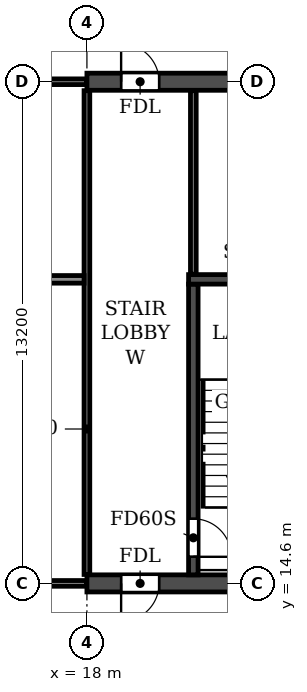
"""IFC4 building model, lengths in metres.
Left out: names, types, materials, properties, quantities, classifications, styles, units other than length and angle.
Written with IfcOpenShell. Run it as: python <this file> out.ifc"""

import sys

from ifc_helpers import new_model, si_unit, direction, frame, frame_2d, origin, place, context, subcontext, project, spatial, rectangle, extrude, element, fill, save


model = new_model("IFC4")
c1 = context("Model", 3, precision=1e-05, world=origin(), true_north=direction((0.0, 1.0)))
c2 = subcontext(c1, "Body", "Model", "MODEL_VIEW")
j1 = project(units=[si_unit("LENGTHUNIT", "METRE"), si_unit("PLANEANGLEUNIT", "RADIAN")], contexts=[c1])
p1 = place(None, origin())
s1 = spatial("IfcSite", under=j1, at=p1, CompositionType="ELEMENT")
p2 = place(p1, origin())
s2 = spatial("IfcBuilding", under=s1, at=p2, CompositionType="ELEMENT")
p3 = place(p2, frame((0.0, 0.0, 6.0)))
s3 = spatial("IfcBuildingStorey", under=s2, at=p3, CompositionType="ELEMENT", Elevation=6.0)
p4 = place(p3, frame((18.0, 14.6, 0.0), z_axis=(0.0, 0.0, 1.0), x_axis=(1.0, 0.0, 0.0)))
e1 = element("IfcWall", 1, at=p4, inside=s3, PredefinedType="SOLIDWALL", context=c2, shape_type="SweptSolid", body=[
    extrude(rectangle(XDim=66.0, YDim=0.45, at=frame_2d((33.0, 0.0))), origin(), (0.0, 0.0, 1.0), 4.52),
])
p5 = place(p4, frame((0.9, 0.0, 0.0)))
e2 = element("IfcOpeningElement", 2, at=p5, cuts=e1, PredefinedType="OPENING", context=c2, shape_type="SweptSolid", body=[
    extrude(rectangle(XDim=1.0, YDim=2.1, at=frame_2d((0.5, 1.05))), frame((0.0, 0.235, 0.0), z_axis=(0.0, -1.0, 0.0), x_axis=(1.0, 0.0, 0.0)), (0.0, 0.0, 1.0), 0.47),
])
p6 = place(p4, frame((8.8, 0.0, 0.0)))
e3 = element("IfcOpeningElement", 3, at=p6, cuts=e1, PredefinedType="OPENING", context=c2, shape_type="SweptSolid", body=[
    extrude(rectangle(XDim=1.0, YDim=2.1, at=frame_2d((0.5, 1.05))), frame((0.0, 0.235, 0.0), z_axis=(0.0, -1.0, 0.0), x_axis=(1.0, 0.0, 0.0)), (0.0, 0.0, 1.0), 0.47),
])
p7 = place(p4, frame((13.4, 0.0, 0.0)))
e4 = element("IfcOpeningElement", 4, at=p7, cuts=e1, PredefinedType="OPENING", context=c2, shape_type="SweptSolid", body=[
    extrude(rectangle(XDim=1.0, YDim=2.1, at=frame_2d((0.5, 1.05))), frame((0.0, 0.235, 0.0), z_axis=(0.0, -1.0, 0.0), x_axis=(1.0, 0.0, 0.0)), (0.0, 0.0, 1.0), 0.47),
])
p8 = place(p4, frame((26.0, 0.0, 0.0)))
e5 = element("IfcOpeningElement", 5, at=p8, cuts=e1, PredefinedType="OPENING", context=c2, shape_type="SweptSolid", body=[
    extrude(rectangle(XDim=1.0, YDim=2.1, at=frame_2d((0.5, 1.05))), frame((0.0, 0.235, 0.0), z_axis=(0.0, -1.0, 0.0), x_axis=(1.0, 0.0, 0.0)), (0.0, 0.0, 1.0), 0.47),
])
p9 = place(p4, frame((29.9, 0.0, 0.0)))
e6 = element("IfcOpeningElement", 6, at=p9, cuts=e1, PredefinedType="OPENING", context=c2, shape_type="SweptSolid", body=[
    extrude(rectangle(XDim=1.0, YDim=2.1, at=frame_2d((0.5, 1.05))), frame((0.0, 0.235, 0.0), z_axis=(0.0, -1.0, 0.0), x_axis=(1.0, 0.0, 0.0)), (0.0, 0.0, 1.0), 0.47),
])
p10 = place(p4, frame((32.5, 0.0, 0.0)))
e7 = element("IfcOpeningElement", 7, at=p10, cuts=e1, PredefinedType="OPENING", context=c2, shape_type="SweptSolid", body=[
    extrude(rectangle(XDim=1.0, YDim=2.1, at=frame_2d((0.5, 1.05))), frame((0.0, 0.235, 0.0), z_axis=(0.0, -1.0, 0.0), x_axis=(1.0, 0.0, 0.0)), (0.0, 0.0, 1.0), 0.47),
])
p11 = place(p4, frame((37.7, 0.0, 0.0)))
e8 = element("IfcOpeningElement", 8, at=p11, cuts=e1, PredefinedType="OPENING", context=c2, shape_type="SweptSolid", body=[
    extrude(rectangle(XDim=1.0, YDim=2.1, at=frame_2d((0.5, 1.05))), frame((0.0, 0.235, 0.0), z_axis=(0.0, -1.0, 0.0), x_axis=(1.0, 0.0, 0.0)), (0.0, 0.0, 1.0), 0.47),
])
p12 = place(p4, frame((51.6, 0.0, 0.0)))
e9 = element("IfcOpeningElement", 9, at=p12, cuts=e1, PredefinedType="OPENING", context=c2, shape_type="SweptSolid", body=[
    extrude(rectangle(XDim=1.0, YDim=2.1, at=frame_2d((0.5, 1.05))), frame((0.0, 0.235, 0.0), z_axis=(0.0, -1.0, 0.0), x_axis=(1.0, 0.0, 0.0)), (0.0, 0.0, 1.0), 0.47),
])
p13 = place(p4, frame((56.2, 0.0, 0.0)))
e10 = element("IfcOpeningElement", 10, at=p13, cuts=e1, PredefinedType="OPENING", context=c2, shape_type="SweptSolid", body=[
    extrude(rectangle(XDim=1.0, YDim=2.1, at=frame_2d((0.5, 1.05))), frame((0.0, 0.235, 0.0), z_axis=(0.0, -1.0, 0.0), x_axis=(1.0, 0.0, 0.0)), (0.0, 0.0, 1.0), 0.47),
])
p14 = place(p4, frame((64.1, 0.0, 0.0)))
e11 = element("IfcOpeningElement", 11, at=p14, cuts=e1, PredefinedType="OPENING", context=c2, shape_type="SweptSolid", body=[
    extrude(rectangle(XDim=1.0, YDim=2.1, at=frame_2d((0.5, 1.05))), frame((0.0, 0.235, 0.0), z_axis=(0.0, -1.0, 0.0), x_axis=(1.0, 0.0, 0.0)), (0.0, 0.0, 1.0), 0.47),
])
p15 = place(p3, frame((18.0, 27.8, 0.0), z_axis=(0.0, 0.0, 1.0), x_axis=(1.0, 0.0, 0.0)))
e12 = element("IfcWall", 12, at=p15, inside=s3, PredefinedType="SOLIDWALL", context=c2, shape_type="SweptSolid", body=[
    extrude(rectangle(XDim=66.0, YDim=0.45, at=frame_2d((33.0, 0.0))), origin(), (0.0, 0.0, 1.0), 4.52),
])
p16 = place(p15, frame((0.9, 0.0, 0.0)))
e13 = element("IfcOpeningElement", 13, at=p16, cuts=e12, PredefinedType="OPENING", context=c2, shape_type="SweptSolid", body=[
    extrude(rectangle(XDim=1.0, YDim=2.1, at=frame_2d((0.5, 1.05))), frame((0.0, 0.235, 0.0), z_axis=(0.0, -1.0, 0.0), x_axis=(1.0, 0.0, 0.0)), (0.0, 0.0, 1.0), 0.47),
])
p17 = place(p15, frame((4.25, 0.0, 0.0)))
e14 = element("IfcOpeningElement", 14, at=p17, cuts=e12, PredefinedType="OPENING", context=c2, shape_type="SweptSolid", body=[
    extrude(rectangle(XDim=0.9, YDim=2.1, at=frame_2d((0.45, 1.05))), frame((0.0, 0.235, 0.0), z_axis=(0.0, -1.0, 0.0), x_axis=(1.0, 0.0, 0.0)), (0.0, 0.0, 1.0), 0.47),
])
p18 = place(p15, frame((8.85, 0.0, 0.0)))
e15 = element("IfcOpeningElement", 15, at=p18, cuts=e12, PredefinedType="OPENING", context=c2, shape_type="SweptSolid", body=[
    extrude(rectangle(XDim=0.9, YDim=2.1, at=frame_2d((0.45, 1.05))), frame((0.0, 0.235, 0.0), z_axis=(0.0, -1.0, 0.0), x_axis=(1.0, 0.0, 0.0)), (0.0, 0.0, 1.0), 0.47),
])
p19 = place(p15, frame((13.45, 0.0, 0.0)))
e16 = element("IfcOpeningElement", 16, at=p19, cuts=e12, PredefinedType="OPENING", context=c2, shape_type="SweptSolid", body=[
    extrude(rectangle(XDim=0.9, YDim=2.1, at=frame_2d((0.45, 1.05))), frame((0.0, 0.235, 0.0), z_axis=(0.0, -1.0, 0.0), x_axis=(1.0, 0.0, 0.0)), (0.0, 0.0, 1.0), 0.47),
])
p20 = place(p15, frame((17.9, 0.0, 0.0)))
e17 = element("IfcOpeningElement", 17, at=p20, cuts=e12, PredefinedType="OPENING", context=c2, shape_type="SweptSolid", body=[
    extrude(rectangle(XDim=1.0, YDim=2.1, at=frame_2d((0.5, 1.05))), frame((0.0, 0.235, 0.0), z_axis=(0.0, -1.0, 0.0), x_axis=(1.0, 0.0, 0.0)), (0.0, 0.0, 1.0), 0.47),
])
p21 = place(p15, frame((23.1, 0.0, 0.0)))
e18 = element("IfcOpeningElement", 18, at=p21, cuts=e12, PredefinedType="OPENING", context=c2, shape_type="SweptSolid", body=[
    extrude(rectangle(XDim=1.0, YDim=2.1, at=frame_2d((0.5, 1.05))), frame((0.0, 0.235, 0.0), z_axis=(0.0, -1.0, 0.0), x_axis=(1.0, 0.0, 0.0)), (0.0, 0.0, 1.0), 0.47),
])
p22 = place(p15, frame((29.6, 0.0, 0.0)))
e19 = element("IfcOpeningElement", 19, at=p22, cuts=e12, PredefinedType="OPENING", context=c2, shape_type="SweptSolid", body=[
    extrude(rectangle(XDim=1.0, YDim=2.1, at=frame_2d((0.5, 1.05))), frame((0.0, 0.235, 0.0), z_axis=(0.0, -1.0, 0.0), x_axis=(1.0, 0.0, 0.0)), (0.0, 0.0, 1.0), 0.47),
])
p23 = place(p15, frame((32.5, 0.0, 0.0)))
e20 = element("IfcOpeningElement", 20, at=p23, cuts=e12, PredefinedType="OPENING", context=c2, shape_type="SweptSolid", body=[
    extrude(rectangle(XDim=1.0, YDim=2.1, at=frame_2d((0.5, 1.05))), frame((0.0, 0.235, 0.0), z_axis=(0.0, -1.0, 0.0), x_axis=(1.0, 0.0, 0.0)), (0.0, 0.0, 1.0), 0.47),
])
p24 = place(p15, frame((38.0, 0.0, 0.0)))
e21 = element("IfcOpeningElement", 21, at=p24, cuts=e12, PredefinedType="OPENING", context=c2, shape_type="SweptSolid", body=[
    extrude(rectangle(XDim=1.0, YDim=2.1, at=frame_2d((0.5, 1.05))), frame((0.0, 0.235, 0.0), z_axis=(0.0, -1.0, 0.0), x_axis=(1.0, 0.0, 0.0)), (0.0, 0.0, 1.0), 0.47),
])
p25 = place(p15, frame((43.2, 0.0, 0.0)))
e22 = element("IfcOpeningElement", 22, at=p25, cuts=e12, PredefinedType="OPENING", context=c2, shape_type="SweptSolid", body=[
    extrude(rectangle(XDim=1.0, YDim=2.1, at=frame_2d((0.5, 1.05))), frame((0.0, 0.235, 0.0), z_axis=(0.0, -1.0, 0.0), x_axis=(1.0, 0.0, 0.0)), (0.0, 0.0, 1.0), 0.47),
])
p26 = place(p15, frame((45.8, 0.0, 0.0)))
e23 = element("IfcOpeningElement", 23, at=p26, cuts=e12, PredefinedType="OPENING", context=c2, shape_type="SweptSolid", body=[
    extrude(rectangle(XDim=1.0, YDim=2.1, at=frame_2d((0.5, 1.05))), frame((0.0, 0.235, 0.0), z_axis=(0.0, -1.0, 0.0), x_axis=(1.0, 0.0, 0.0)), (0.0, 0.0, 1.0), 0.47),
])
p27 = place(p15, frame((48.4, 0.0, 0.0)))
e24 = element("IfcOpeningElement", 24, at=p27, cuts=e12, PredefinedType="OPENING", context=c2, shape_type="SweptSolid", body=[
    extrude(rectangle(XDim=1.0, YDim=2.1, at=frame_2d((0.5, 1.05))), frame((0.0, 0.235, 0.0), z_axis=(0.0, -1.0, 0.0), x_axis=(1.0, 0.0, 0.0)), (0.0, 0.0, 1.0), 0.47),
])
p28 = place(p15, frame((51.65, 0.0, 0.0)))
e25 = element("IfcOpeningElement", 25, at=p28, cuts=e12, PredefinedType="OPENING", context=c2, shape_type="SweptSolid", body=[
    extrude(rectangle(XDim=0.9, YDim=2.1, at=frame_2d((0.45, 1.05))), frame((0.0, 0.235, 0.0), z_axis=(0.0, -1.0, 0.0), x_axis=(1.0, 0.0, 0.0)), (0.0, 0.0, 1.0), 0.47),
])
p29 = place(p15, frame((56.25, 0.0, 0.0)))
e26 = element("IfcOpeningElement", 26, at=p29, cuts=e12, PredefinedType="OPENING", context=c2, shape_type="SweptSolid", body=[
    extrude(rectangle(XDim=0.9, YDim=2.1, at=frame_2d((0.45, 1.05))), frame((0.0, 0.235, 0.0), z_axis=(0.0, -1.0, 0.0), x_axis=(1.0, 0.0, 0.0)), (0.0, 0.0, 1.0), 0.47),
])
p30 = place(p15, frame((60.85, 0.0, 0.0)))
e27 = element("IfcOpeningElement", 27, at=p30, cuts=e12, PredefinedType="OPENING", context=c2, shape_type="SweptSolid", body=[
    extrude(rectangle(XDim=0.9, YDim=2.1, at=frame_2d((0.45, 1.05))), frame((0.0, 0.235, 0.0), z_axis=(0.0, -1.0, 0.0), x_axis=(1.0, 0.0, 0.0)), (0.0, 0.0, 1.0), 0.47),
])
p31 = place(p15, frame((64.1, 0.0, 0.0)))
e28 = element("IfcOpeningElement", 28, at=p31, cuts=e12, PredefinedType="OPENING", context=c2, shape_type="SweptSolid", body=[
    extrude(rectangle(XDim=1.0, YDim=2.1, at=frame_2d((0.5, 1.05))), frame((0.0, 0.235, 0.0), z_axis=(0.0, -1.0, 0.0), x_axis=(1.0, 0.0, 0.0)), (0.0, 0.0, 1.0), 0.47),
])
p32 = place(p3, frame((20.8, 14.825, 0.0), z_axis=(0.0, 0.0, 1.0), x_axis=(0.0, 1.0, 0.0)))
e29 = element("IfcWall", 29, at=p32, inside=s3, PredefinedType="SOLIDWALL", context=c2, shape_type="SweptSolid", body=[
    extrude(rectangle(XDim=7.65, YDim=0.25, at=frame_2d((3.825, 0.0))), origin(), (0.0, 0.0, 1.0), 4.52),
])
p33 = place(p32, frame((0.475, 0.0, 0.0)))
e30 = element("IfcOpeningElement", 30, at=p33, cuts=e29, PredefinedType="OPENING", context=c2, shape_type="SweptSolid", body=[
    extrude(rectangle(XDim=1.0, YDim=2.1, at=frame_2d((0.5, 1.05))), frame((0.0, 0.135, 0.0), z_axis=(0.0, -1.0, 0.0), x_axis=(1.0, 0.0, 0.0)), (0.0, 0.0, 1.0), 0.27),
])
p34 = place(p3, frame((20.675, 22.6, 0.0), z_axis=(0.0, 0.0, 1.0), x_axis=(1.0, 0.0, 0.0)))
e31 = element("IfcWall", 31, at=p34, inside=s3, PredefinedType="SOLIDWALL", context=c2, shape_type="SweptSolid", body=[
    extrude(rectangle(XDim=4.05, YDim=0.25, at=frame_2d((2.025, 0.0))), origin(), (0.0, 0.0, 1.0), 4.52),
])
p35 = place(p3, frame((2.525, 14.6, 0.0), z_axis=(0.0, 0.0, 1.0), x_axis=(1.0, 0.0, 0.0)))
e32 = element("IfcWall", 32, at=p35, inside=s3, PredefinedType="PARTITIONING", context=c2, shape_type="SweptSolid", body=[
    extrude(rectangle(XDim=15.465, YDim=0.15, at=frame_2d((7.732, 0.0))), origin(), (0.0, 0.0, 1.0), 4.52),
])
p36 = place(p35, frame((11.175, 0.0, 0.0)))
e33 = element("IfcOpeningElement", 33, at=p36, cuts=e32, PredefinedType="OPENING", context=c2, shape_type="SweptSolid", body=[
    extrude(rectangle(XDim=0.9, YDim=2.1, at=frame_2d((0.45, 1.05))), frame((0.0, 0.085, 0.0), z_axis=(0.0, -1.0, 0.0), x_axis=(1.0, 0.0, 0.0)), (0.0, 0.0, 1.0), 0.17),
])
p37 = place(p3, frame((2.525, 27.8, 0.0), z_axis=(0.0, 0.0, 1.0), x_axis=(1.0, 0.0, 0.0)))
e34 = element("IfcWall", 34, at=p37, inside=s3, PredefinedType="PARTITIONING", context=c2, shape_type="SweptSolid", body=[
    extrude(rectangle(XDim=15.465, YDim=0.15, at=frame_2d((7.732, 0.0))), origin(), (0.0, 0.0, 1.0), 4.52),
])
p38 = place(p37, frame((3.475, 0.0, 0.0)))
e35 = element("IfcOpeningElement", 35, at=p38, cuts=e34, PredefinedType="OPENING", context=c2, shape_type="SweptSolid", body=[
    extrude(rectangle(XDim=0.9, YDim=2.1, at=frame_2d((0.45, 1.05))), frame((0.0, 0.085, 0.0), z_axis=(0.0, -1.0, 0.0), x_axis=(1.0, 0.0, 0.0)), (0.0, 0.0, 1.0), 0.17),
])
p39 = place(p37, frame((11.175, 0.0, 0.0)))
e36 = element("IfcOpeningElement", 36, at=p39, cuts=e34, PredefinedType="OPENING", context=c2, shape_type="SweptSolid", body=[
    extrude(rectangle(XDim=0.9, YDim=2.1, at=frame_2d((0.45, 1.05))), frame((0.0, 0.085, 0.0), z_axis=(0.0, -1.0, 0.0), x_axis=(1.0, 0.0, 0.0)), (0.0, 0.0, 1.0), 0.17),
])
p40 = place(p3, frame((18.0, 14.835, 0.0), z_axis=(0.0, 0.0, 1.0), x_axis=(0.0, 1.0, 0.0)))
e37 = element("IfcWall", 37, at=p40, inside=s3, PredefinedType="PARTITIONING", context=c2, shape_type="SweptSolid", body=[
    extrude(rectangle(XDim=12.73, YDim=0.15, at=frame_2d((6.365, 0.0))), origin(), (0.0, 0.0, 1.0), 4.52),
])
p41 = place(p3, frame((2.675, 22.6, 0.0), z_axis=(0.0, 0.0, 1.0), x_axis=(1.0, 0.0, 0.0)))
e38 = element("IfcWall", 38, at=p41, inside=s3, PredefinedType="PARTITIONING", context=c2, shape_type="SweptSolid", body=[
    extrude(rectangle(XDim=15.25, YDim=0.2, at=frame_2d((7.625, 0.0))), origin(), (0.0, 0.0, 1.0), 4.52),
])
p42 = place(p3, frame((20.8, 22.735, 0.0), z_axis=(0.0, 0.0, 1.0), x_axis=(0.0, 1.0, 0.0)))
e39 = element("IfcWall", 39, at=p42, inside=s3, PredefinedType="PARTITIONING", context=c2, shape_type="SweptSolid", body=[
    extrude(rectangle(XDim=4.83, YDim=0.15, at=frame_2d((2.415, 0.0))), origin(), (0.0, 0.0, 1.0), 4.52),
])
p43 = place(p16, origin())
e40 = element("IfcDoor", 40, at=p43, inside=s3, OperationType="SINGLE_SWING_LEFT", PredefinedType="DOOR", context=c2, shape_type="SweptSolid", body=[
    extrude(rectangle(XDim=1.0, YDim=2.1, at=frame_2d((0.5, 1.05))), frame((0.0, 0.025, 0.0), z_axis=(0.0, -1.0, 0.0), x_axis=(1.0, 0.0, 0.0)), (0.0, 0.0, 1.0), 0.05),
])
fill(e13, e40)
p44 = place(p5, frame((1.0, 0.0, 0.0), z_axis=(0.0, 0.0, 1.0), x_axis=(-1.0, 0.0, 0.0)))
e41 = element("IfcDoor", 41, at=p44, inside=s3, OperationType="SINGLE_SWING_RIGHT", PredefinedType="DOOR", context=c2, shape_type="SweptSolid", body=[
    extrude(rectangle(XDim=1.0, YDim=2.1, at=frame_2d((0.5, 1.05))), frame((0.0, 0.025, 0.0), z_axis=(0.0, -1.0, 0.0), x_axis=(1.0, 0.0, 0.0)), (0.0, 0.0, 1.0), 0.05),
])
fill(e2, e41)
p45 = place(p33, frame((1.0, 0.0, 0.0), z_axis=(0.0, 0.0, 1.0), x_axis=(-1.0, 0.0, 0.0)))
e42 = element("IfcDoor", 42, at=p45, inside=s3, OperationType="SINGLE_SWING_RIGHT", PredefinedType="DOOR", context=c2, shape_type="SweptSolid", body=[
    extrude(rectangle(XDim=1.0, YDim=2.1, at=frame_2d((0.5, 1.05))), frame((0.0, 0.025, 0.0), z_axis=(0.0, -1.0, 0.0), x_axis=(1.0, 0.0, 0.0)), (0.0, 0.0, 1.0), 0.05),
])
fill(e30, e42)
save(model, sys.argv[1])
